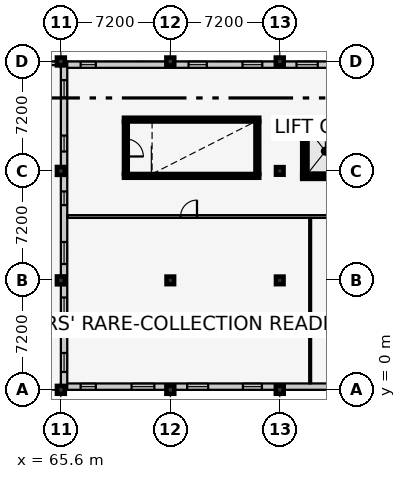
"""IFC4 building model, lengths in metres.
Left out: names, types, materials, properties, quantities, classifications, styles, units other than length and angle.
Written with IfcOpenShell. Run it as: python <this file> out.ifc"""

import sys

from ifc_helpers import new_model, si_unit, direction, frame, frame_2d, origin, origin_2d, place, context, subcontext, project, spatial, rectangle, extrude, element, fill, save


model = new_model("IFC4")
c1 = context("Model", 3, precision=1e-05, world=origin(), true_north=direction((0.0, 1.0)))
c2 = subcontext(c1, "Body", "Model", "MODEL_VIEW")
j1 = project(units=[si_unit("LENGTHUNIT", "METRE"), si_unit("PLANEANGLEUNIT", "RADIAN")], contexts=[c1])
p1 = place(None, origin())
s1 = spatial("IfcSite", under=j1, at=p1, CompositionType="ELEMENT")
p2 = place(p1, origin())
s2 = spatial("IfcBuilding", under=s1, at=p2, CompositionType="ELEMENT")
p3 = place(p2, frame((0.0, 0.0, 18.0)))
s3 = spatial("IfcBuildingStorey", under=s2, at=p3, CompositionType="ELEMENT", Elevation=18.0)
for number, where, z_axis, x_axis in (
    (1, (65.6, 0.0, 0.0), (0.0, 0.0, 1.0), (1.0, 0.0, 0.0)),
    (2, (65.6, 7.2, 0.0), (0.0, 0.0, 1.0), (1.0, 0.0, 0.0)),
    (3, (65.6, 14.4, 0.0), (0.0, 0.0, 1.0), (1.0, 0.0, 0.0)),
    (4, (65.6, 21.6, 0.0), (0.0, 0.0, 1.0), (1.0, 0.0, 0.0)),
    (5, (72.8, 0.0, 0.0), (0.0, 0.0, 1.0), (1.0, 0.0, 0.0)),
):
    element("IfcColumn", number, at=place(p3, frame(where, z_axis=z_axis, x_axis=x_axis)), inside=s3, PredefinedType="COLUMN", context=c2, shape_type="SweptSolid", body=[
        extrude(rectangle(XDim=0.52, YDim=0.52, at=origin_2d()), origin(), (0.0, 0.0, 1.0), 3.9),
    ])
p4 = place(p3, frame((72.8, 7.2, 0.0), z_axis=(0.0, 0.0, 1.0), x_axis=(1.0, 0.0, 0.0)))
e6 = element("IfcColumn", 6, at=p4, inside=s3, PredefinedType="COLUMN", context=c2, shape_type="SweptSolid", body=[
    extrude(rectangle(XDim=0.5, YDim=0.5, at=origin_2d()), origin(), (0.0, 0.0, 1.0), 3.9),
])
for number, where, z_axis, x_axis in (
    (7, (72.8, 21.6, 0.0), (0.0, 0.0, 1.0), (1.0, 0.0, 0.0)),
    (8, (80.0, 0.0, 0.0), (0.0, 0.0, 1.0), (1.0, 0.0, 0.0)),
):
    element("IfcColumn", number, at=place(p3, frame(where, z_axis=z_axis, x_axis=x_axis)), inside=s3, PredefinedType="COLUMN", context=c2, shape_type="SweptSolid", body=[
        extrude(rectangle(XDim=0.52, YDim=0.52, at=origin_2d()), origin(), (0.0, 0.0, 1.0), 3.9),
    ])
for number, where, z_axis, x_axis in (
    (9, (80.0, 7.2, 0.0), (0.0, 0.0, 1.0), (1.0, 0.0, 0.0)),
    (10, (80.0, 14.4, 0.0), (0.0, 0.0, 1.0), (1.0, 0.0, 0.0)),
):
    element("IfcColumn", number, at=place(p3, frame(where, z_axis=z_axis, x_axis=x_axis)), inside=s3, PredefinedType="COLUMN", context=c2, shape_type="SweptSolid", body=[
        extrude(rectangle(XDim=0.5, YDim=0.5, at=origin_2d()), origin(), (0.0, 0.0, 1.0), 3.9),
    ])
p5 = place(p3, frame((80.0, 21.6, 0.0), z_axis=(0.0, 0.0, 1.0), x_axis=(1.0, 0.0, 0.0)))
e11 = element("IfcColumn", 11, at=p5, inside=s3, PredefinedType="COLUMN", context=c2, shape_type="SweptSolid", body=[
    extrude(rectangle(XDim=0.52, YDim=0.52, at=origin_2d()), origin(), (0.0, 0.0, 1.0), 3.9),
])
p6 = place(p3, frame((94.4, 0.21, 0.0), z_axis=(0.0, 0.0, 1.0), x_axis=(-1.0, 0.0, 0.0)))
e12 = element("IfcWall", 12, at=p6, inside=s3, PredefinedType="SOLIDWALL", context=c2, shape_type="SweptSolid", body=[
    extrude(rectangle(XDim=28.8, YDim=0.42, at=frame_2d((14.4, 0.0))), origin(), (0.0, 0.0, 1.0), 2.955),
])
p7 = place(p6, frame((1.075, 0.0, 0.9)))
e13 = element("IfcOpeningElement", 13, at=p7, cuts=e12, PredefinedType="OPENING", context=c2, shape_type="SweptSolid", body=[
    extrude(rectangle(XDim=1.45, YDim=1.45, at=frame_2d((0.725, 0.725))), frame((0.0, 0.222, 0.0), z_axis=(0.0, -1.0, 0.0), x_axis=(1.0, 0.0, 0.0)), (0.0, 0.0, 1.0), 0.444),
])
p8 = place(p6, frame((4.95, 0.0, 0.9)))
e14 = element("IfcOpeningElement", 14, at=p8, cuts=e12, PredefinedType="OPENING", context=c2, shape_type="SweptSolid", body=[
    extrude(rectangle(XDim=0.9, YDim=1.6, at=frame_2d((0.45, 0.8))), frame((0.0, 0.222, 0.0), z_axis=(0.0, -1.0, 0.0), x_axis=(1.0, 0.0, 0.0)), (0.0, 0.0, 1.0), 0.444),
])
p9 = place(p6, frame((8.475, 0.0, 0.9)))
e15 = element("IfcOpeningElement", 15, at=p9, cuts=e12, PredefinedType="OPENING", context=c2, shape_type="SweptSolid", body=[
    extrude(rectangle(XDim=1.05, YDim=1.6, at=frame_2d((0.525, 0.8))), frame((0.0, 0.222, 0.0), z_axis=(0.0, -1.0, 0.0), x_axis=(1.0, 0.0, 0.0)), (0.0, 0.0, 1.0), 0.444),
])
p10 = place(p6, frame((15.575, 0.0, 0.9)))
e16 = element("IfcOpeningElement", 16, at=p10, cuts=e12, PredefinedType="OPENING", context=c2, shape_type="SweptSolid", body=[
    extrude(rectangle(XDim=1.25, YDim=1.6, at=frame_2d((0.625, 0.8))), frame((0.0, 0.222, 0.0), z_axis=(0.0, -1.0, 0.0), x_axis=(1.0, 0.0, 0.0)), (0.0, 0.0, 1.0), 0.444),
])
p11 = place(p6, frame((19.11, 0.0, 0.9)))
e17 = element("IfcOpeningElement", 17, at=p11, cuts=e12, PredefinedType="OPENING", context=c2, shape_type="SweptSolid", body=[
    extrude(rectangle(XDim=1.38, YDim=1.6, at=frame_2d((0.69, 0.8))), frame((0.0, 0.222, 0.0), z_axis=(0.0, -1.0, 0.0), x_axis=(1.0, 0.0, 0.0)), (0.0, 0.0, 1.0), 0.444),
])
p12 = place(p6, frame((22.65, 0.0, 0.9)))
e18 = element("IfcOpeningElement", 18, at=p12, cuts=e12, PredefinedType="OPENING", context=c2, shape_type="SweptSolid", body=[
    extrude(rectangle(XDim=1.5, YDim=1.6, at=frame_2d((0.75, 0.8))), frame((0.0, 0.222, 0.0), z_axis=(0.0, -1.0, 0.0), x_axis=(1.0, 0.0, 0.0)), (0.0, 0.0, 1.0), 0.444),
])
p13 = place(p6, frame((26.5, 0.0, 0.9)))
e19 = element("IfcOpeningElement", 19, at=p13, cuts=e12, PredefinedType="OPENING", context=c2, shape_type="SweptSolid", body=[
    extrude(rectangle(XDim=1.0, YDim=1.75, at=frame_2d((0.5, 0.875))), frame((0.0, 0.222, 0.0), z_axis=(0.0, -1.0, 0.0), x_axis=(1.0, 0.0, 0.0)), (0.0, 0.0, 1.0), 0.444),
])
p14 = place(p3, frame((65.6, 21.39, 0.0), z_axis=(0.0, 0.0, 1.0), x_axis=(1.0, 0.0, 0.0)))
e20 = element("IfcWall", 20, at=p14, inside=s3, PredefinedType="SOLIDWALL", context=c2, shape_type="SweptSolid", body=[
    extrude(rectangle(XDim=28.8, YDim=0.42, at=frame_2d((14.4, 0.0))), origin(), (0.0, 0.0, 1.0), 2.955),
])
p15 = place(p14, frame((1.3, 0.0, 0.9)))
e21 = element("IfcOpeningElement", 21, at=p15, cuts=e20, PredefinedType="OPENING", context=c2, shape_type="SweptSolid", body=[
    extrude(rectangle(XDim=1.0, YDim=1.35, at=frame_2d((0.5, 0.675))), frame((0.0, 0.222, 0.0), z_axis=(0.0, -1.0, 0.0), x_axis=(1.0, 0.0, 0.0)), (0.0, 0.0, 1.0), 0.444),
])
p16 = place(p14, frame((8.4, 0.0, 0.9)))
e22 = element("IfcOpeningElement", 22, at=p16, cuts=e20, PredefinedType="OPENING", context=c2, shape_type="SweptSolid", body=[
    extrude(rectangle(XDim=1.2, YDim=1.35, at=frame_2d((0.6, 0.675))), frame((0.0, 0.222, 0.0), z_axis=(0.0, -1.0, 0.0), x_axis=(1.0, 0.0, 0.0)), (0.0, 0.0, 1.0), 0.444),
])
p17 = place(p14, frame((11.95, 0.0, 0.9)))
e23 = element("IfcOpeningElement", 23, at=p17, cuts=e20, PredefinedType="OPENING", context=c2, shape_type="SweptSolid", body=[
    extrude(rectangle(XDim=1.3, YDim=1.35, at=frame_2d((0.65, 0.675))), frame((0.0, 0.222, 0.0), z_axis=(0.0, -1.0, 0.0), x_axis=(1.0, 0.0, 0.0)), (0.0, 0.0, 1.0), 0.444),
])
p18 = place(p14, frame((15.5, 0.0, 0.9)))
e24 = element("IfcOpeningElement", 24, at=p18, cuts=e20, PredefinedType="OPENING", context=c2, shape_type="SweptSolid", body=[
    extrude(rectangle(XDim=1.4, YDim=1.35, at=frame_2d((0.7, 0.675))), frame((0.0, 0.222, 0.0), z_axis=(0.0, -1.0, 0.0), x_axis=(1.0, 0.0, 0.0)), (0.0, 0.0, 1.0), 0.444),
])
p19 = place(p14, frame((22.875, 0.0, 0.9)))
e25 = element("IfcOpeningElement", 25, at=p19, cuts=e20, PredefinedType="OPENING", context=c2, shape_type="SweptSolid", body=[
    extrude(rectangle(XDim=1.05, YDim=1.45, at=frame_2d((0.525, 0.725))), frame((0.0, 0.222, 0.0), z_axis=(0.0, -1.0, 0.0), x_axis=(1.0, 0.0, 0.0)), (0.0, 0.0, 1.0), 0.444),
])
p20 = place(p14, frame((26.425, 0.0, 0.9)))
e26 = element("IfcOpeningElement", 26, at=p20, cuts=e20, PredefinedType="OPENING", context=c2, shape_type="SweptSolid", body=[
    extrude(rectangle(XDim=1.15, YDim=1.45, at=frame_2d((0.575, 0.725))), frame((0.0, 0.222, 0.0), z_axis=(0.0, -1.0, 0.0), x_axis=(1.0, 0.0, 0.0)), (0.0, 0.0, 1.0), 0.444),
])
p21 = place(p3, frame((65.81, 0.0, 0.0), z_axis=(0.0, 0.0, 1.0), x_axis=(0.0, 1.0, 0.0)))
e27 = element("IfcWall", 27, at=p21, inside=s3, PredefinedType="SOLIDWALL", context=c2, shape_type="SweptSolid", body=[
    extrude(rectangle(XDim=21.6, YDim=0.42, at=frame_2d((10.8, 0.0))), origin(), (0.0, 0.0, 1.0), 3.055),
])
p22 = place(p21, frame((1.175, 0.0, 0.9)))
e28 = element("IfcOpeningElement", 28, at=p22, cuts=e27, PredefinedType="OPENING", context=c2, shape_type="SweptSolid", body=[
    extrude(rectangle(XDim=1.25, YDim=1.45, at=frame_2d((0.625, 0.725))), frame((0.0, 0.222, 0.0), z_axis=(0.0, -1.0, 0.0), x_axis=(1.0, 0.0, 0.0)), (0.0, 0.0, 1.0), 0.444),
])
p23 = place(p21, frame((4.725, 0.0, 0.9)))
e29 = element("IfcOpeningElement", 29, at=p23, cuts=e27, PredefinedType="OPENING", context=c2, shape_type="SweptSolid", body=[
    extrude(rectangle(XDim=1.35, YDim=1.45, at=frame_2d((0.675, 0.725))), frame((0.0, 0.222, 0.0), z_axis=(0.0, -1.0, 0.0), x_axis=(1.0, 0.0, 0.0)), (0.0, 0.0, 1.0), 0.444),
])
p24 = place(p21, frame((8.275, 0.0, 0.9)))
e30 = element("IfcOpeningElement", 30, at=p24, cuts=e27, PredefinedType="OPENING", context=c2, shape_type="SweptSolid", body=[
    extrude(rectangle(XDim=1.45, YDim=1.45, at=frame_2d((0.725, 0.725))), frame((0.0, 0.222, 0.0), z_axis=(0.0, -1.0, 0.0), x_axis=(1.0, 0.0, 0.0)), (0.0, 0.0, 1.0), 0.444),
])
p25 = place(p21, frame((12.15, 0.0, 0.9)))
e31 = element("IfcOpeningElement", 31, at=p25, cuts=e27, PredefinedType="OPENING", context=c2, shape_type="SweptSolid", body=[
    extrude(rectangle(XDim=0.9, YDim=1.6, at=frame_2d((0.45, 0.8))), frame((0.0, 0.222, 0.0), z_axis=(0.0, -1.0, 0.0), x_axis=(1.0, 0.0, 0.0)), (0.0, 0.0, 1.0), 0.444),
])
p26 = place(p21, frame((15.675, 0.0, 0.9)))
e32 = element("IfcOpeningElement", 32, at=p26, cuts=e27, PredefinedType="OPENING", context=c2, shape_type="SweptSolid", body=[
    extrude(rectangle(XDim=1.05, YDim=1.6, at=frame_2d((0.525, 0.8))), frame((0.0, 0.222, 0.0), z_axis=(0.0, -1.0, 0.0), x_axis=(1.0, 0.0, 0.0)), (0.0, 0.0, 1.0), 0.444),
])
p27 = place(p21, frame((19.225, 0.0, 0.9)))
e33 = element("IfcOpeningElement", 33, at=p27, cuts=e27, PredefinedType="OPENING", context=c2, shape_type="SweptSolid", body=[
    extrude(rectangle(XDim=1.15, YDim=1.6, at=frame_2d((0.575, 0.8))), frame((0.0, 0.222, 0.0), z_axis=(0.0, -1.0, 0.0), x_axis=(1.0, 0.0, 0.0)), (0.0, 0.0, 1.0), 0.444),
])
p28 = place(p3, frame((58.55, 21.48, 0.0), z_axis=(0.0, 0.0, 1.0), x_axis=(1.0, 0.0, 0.0)))
e34 = element("IfcWall", 34, at=p28, inside=s3, PredefinedType="PARAPET", context=c2, shape_type="SweptSolid", body=[
    extrude(rectangle(XDim=6.9, YDim=0.24, at=frame_2d((3.45, 0.0))), origin(), (0.0, 0.0, 1.0), 0.65),
])
for number, where, z_axis, x_axis in (
    (35, (69.75, 14.075, 0.0), (0.0, 0.0, 1.0), (1.0, 0.0, 0.0)),
    (36, (78.65, 17.775, 0.0), (0.0, 0.0, 1.0), (-1.0, 0.0, 0.0)),
):
    element("IfcWall", number, at=place(p3, frame(where, z_axis=z_axis, x_axis=x_axis)), inside=s3, PredefinedType="SHEAR", context=c2, shape_type="SweptSolid", body=[
        extrude(rectangle(XDim=8.9, YDim=0.25, at=frame_2d((4.45, 0.0))), origin(), (0.0, 0.0, 1.0), 3.66),
    ])
p29 = place(p3, frame((69.875, 17.65, 0.0), z_axis=(0.0, 0.0, 1.0), x_axis=(0.0, -1.0, 0.0)))
e37 = element("IfcWall", 37, at=p29, inside=s3, PredefinedType="SHEAR", context=c2, shape_type="SweptSolid", body=[
    extrude(rectangle(XDim=3.45, YDim=0.25, at=frame_2d((1.725, 0.0))), origin(), (0.0, 0.0, 1.0), 3.66),
])
p30 = place(p29, frame((1.15, 0.0, 0.0)))
e38 = element("IfcOpeningElement", 38, at=p30, cuts=e37, PredefinedType="OPENING", context=c2, shape_type="SweptSolid", body=[
    extrude(rectangle(XDim=1.15, YDim=2.15, at=frame_2d((0.575, 1.075))), frame((0.0, 0.137, 0.0), z_axis=(0.0, -1.0, 0.0), x_axis=(1.0, 0.0, 0.0)), (0.0, 0.0, 1.0), 0.274),
])
p31 = place(p3, frame((78.525, 14.2, 0.0), z_axis=(0.0, 0.0, 1.0), x_axis=(0.0, 1.0, 0.0)))
e39 = element("IfcWall", 39, at=p31, inside=s3, PredefinedType="SHEAR", context=c2, shape_type="SweptSolid", body=[
    extrude(rectangle(XDim=3.45, YDim=0.25, at=frame_2d((1.725, 0.0))), origin(), (0.0, 0.0, 1.0), 3.66),
])
p32 = place(p3, frame((81.475, 14.0, 0.0), z_axis=(0.0, 0.0, 1.0), x_axis=(1.0, 0.0, 0.0)))
e40 = element("IfcWall", 40, at=p32, inside=s3, PredefinedType="SHEAR", context=c2, shape_type="SweptSolid", body=[
    extrude(rectangle(XDim=3.05, YDim=0.25, at=frame_2d((1.525, 0.0))), origin(), (0.0, 0.0, 1.0), 3.66),
])
p33 = place(p32, frame((0.725, 0.0, 0.0)))
e41 = element("IfcOpeningElement", 41, at=p33, cuts=e40, PredefinedType="OPENING", context=c2, shape_type="SweptSolid", body=[
    extrude(rectangle(XDim=1.6, YDim=2.3, at=frame_2d((0.8, 1.15))), frame((0.0, 0.137, 0.0), z_axis=(0.0, -1.0, 0.0), x_axis=(1.0, 0.0, 0.0)), (0.0, 0.0, 1.0), 0.274),
])
p34 = place(p3, frame((84.525, 17.4, 0.0), z_axis=(0.0, 0.0, 1.0), x_axis=(-1.0, 0.0, 0.0)))
e42 = element("IfcWall", 42, at=p34, inside=s3, PredefinedType="SHEAR", context=c2, shape_type="SweptSolid", body=[
    extrude(rectangle(XDim=3.05, YDim=0.25, at=frame_2d((1.525, 0.0))), origin(), (0.0, 0.0, 1.0), 3.66),
])
p35 = place(p3, frame((81.6, 17.4, 0.0), z_axis=(0.0, 0.0, 1.0), x_axis=(0.0, -1.0, 0.0)))
e43 = element("IfcWall", 43, at=p35, inside=s3, PredefinedType="SHEAR", context=c2, shape_type="SweptSolid", body=[
    extrude(rectangle(XDim=3.4, YDim=0.25, at=frame_2d((1.7, 0.0))), origin(), (0.0, 0.0, 1.0), 3.66),
])
p36 = place(p3, frame((66.03, 11.4, 0.0), z_axis=(0.0, 0.0, 1.0), x_axis=(1.0, 0.0, 0.0)))
e44 = element("IfcWall", 44, at=p36, inside=s3, PredefinedType="PARTITIONING", context=c2, shape_type="SweptSolid", body=[
    extrude(rectangle(XDim=27.94, YDim=0.18, at=frame_2d((13.97, 0.0))), origin(), (0.0, 0.0, 1.0), 3.66),
])
p37 = place(p36, frame((7.445, 0.0, 0.0)))
e45 = element("IfcOpeningElement", 45, at=p37, cuts=e44, PredefinedType="OPENING", context=c2, shape_type="SweptSolid", body=[
    extrude(rectangle(XDim=1.08, YDim=2.15, at=frame_2d((0.54, 1.075))), frame((0.0, 0.102, 0.0), z_axis=(0.0, -1.0, 0.0), x_axis=(1.0, 0.0, 0.0)), (0.0, 0.0, 1.0), 0.204),
])
p38 = place(p36, frame((21.435, 0.0, 0.0)))
e46 = element("IfcOpeningElement", 46, at=p38, cuts=e44, PredefinedType="OPENING", context=c2, shape_type="SweptSolid", body=[
    extrude(rectangle(XDim=1.04, YDim=2.15, at=frame_2d((0.52, 1.075))), frame((0.0, 0.102, 0.0), z_axis=(0.0, -1.0, 0.0), x_axis=(1.0, 0.0, 0.0)), (0.0, 0.0, 1.0), 0.204),
])
p39 = place(p3, frame((82.0, 0.43, 0.0), z_axis=(0.0, 0.0, 1.0), x_axis=(0.0, 1.0, 0.0)))
e47 = element("IfcWall", 47, at=p39, inside=s3, PredefinedType="PARTITIONING", context=c2, shape_type="SweptSolid", body=[
    extrude(rectangle(XDim=10.87, YDim=0.125, at=frame_2d((5.435, 0.0))), origin(), (0.0, 0.0, 1.0), 3.66),
])
p40 = place(p10, origin())
e48 = element("IfcWindow", 48, at=p40, inside=s3, PartitioningType="SINGLE_PANEL", PredefinedType="WINDOW", context=c2, shape_type="SweptSolid", body=[
    extrude(rectangle(XDim=1.25, YDim=1.6, at=frame_2d((0.625, 0.8))), frame((0.0, 0.03, 0.0), z_axis=(0.0, -1.0, 0.0), x_axis=(1.0, 0.0, 0.0)), (0.0, 0.0, 1.0), 0.06),
])
fill(e16, e48)
p41 = place(p11, origin())
e49 = element("IfcWindow", 49, at=p41, inside=s3, PartitioningType="SINGLE_PANEL", PredefinedType="WINDOW", context=c2, shape_type="SweptSolid", body=[
    extrude(rectangle(XDim=1.38, YDim=1.6, at=frame_2d((0.69, 0.8))), frame((0.0, 0.03, 0.0), z_axis=(0.0, -1.0, 0.0), x_axis=(1.0, 0.0, 0.0)), (0.0, 0.0, 1.0), 0.06),
])
fill(e17, e49)
p42 = place(p12, origin())
e50 = element("IfcWindow", 50, at=p42, inside=s3, PartitioningType="SINGLE_PANEL", PredefinedType="WINDOW", context=c2, shape_type="SweptSolid", body=[
    extrude(rectangle(XDim=1.5, YDim=1.6, at=frame_2d((0.75, 0.8))), frame((0.0, 0.03, 0.0), z_axis=(0.0, -1.0, 0.0), x_axis=(1.0, 0.0, 0.0)), (0.0, 0.0, 1.0), 0.06),
])
fill(e18, e50)
p43 = place(p13, origin())
e51 = element("IfcWindow", 51, at=p43, inside=s3, PartitioningType="SINGLE_PANEL", PredefinedType="WINDOW", context=c2, shape_type="SweptSolid", body=[
    extrude(rectangle(XDim=1.0, YDim=1.75, at=frame_2d((0.5, 0.875))), frame((0.0, 0.03, 0.0), z_axis=(0.0, -1.0, 0.0), x_axis=(1.0, 0.0, 0.0)), (0.0, 0.0, 1.0), 0.06),
])
fill(e19, e51)
p44 = place(p15, origin())
e52 = element("IfcWindow", 52, at=p44, inside=s3, PartitioningType="SINGLE_PANEL", PredefinedType="WINDOW", context=c2, shape_type="SweptSolid", body=[
    extrude(rectangle(XDim=1.0, YDim=1.35, at=frame_2d((0.5, 0.675))), frame((0.0, 0.03, 0.0), z_axis=(0.0, -1.0, 0.0), x_axis=(1.0, 0.0, 0.0)), (0.0, 0.0, 1.0), 0.06),
])
fill(e21, e52)
p45 = place(p16, origin())
e53 = element("IfcWindow", 53, at=p45, inside=s3, PartitioningType="SINGLE_PANEL", PredefinedType="WINDOW", context=c2, shape_type="SweptSolid", body=[
    extrude(rectangle(XDim=1.2, YDim=1.35, at=frame_2d((0.6, 0.675))), frame((0.0, 0.03, 0.0), z_axis=(0.0, -1.0, 0.0), x_axis=(1.0, 0.0, 0.0)), (0.0, 0.0, 1.0), 0.06),
])
fill(e22, e53)
p46 = place(p17, origin())
e54 = element("IfcWindow", 54, at=p46, inside=s3, PartitioningType="SINGLE_PANEL", PredefinedType="WINDOW", context=c2, shape_type="SweptSolid", body=[
    extrude(rectangle(XDim=1.3, YDim=1.35, at=frame_2d((0.65, 0.675))), frame((0.0, 0.03, 0.0), z_axis=(0.0, -1.0, 0.0), x_axis=(1.0, 0.0, 0.0)), (0.0, 0.0, 1.0), 0.06),
])
fill(e23, e54)
p47 = place(p18, origin())
e55 = element("IfcWindow", 55, at=p47, inside=s3, PartitioningType="SINGLE_PANEL", PredefinedType="WINDOW", context=c2, shape_type="SweptSolid", body=[
    extrude(rectangle(XDim=1.4, YDim=1.35, at=frame_2d((0.7, 0.675))), frame((0.0, 0.03, 0.0), z_axis=(0.0, -1.0, 0.0), x_axis=(1.0, 0.0, 0.0)), (0.0, 0.0, 1.0), 0.06),
])
fill(e24, e55)
p48 = place(p22, origin())
e56 = element("IfcWindow", 56, at=p48, inside=s3, PartitioningType="SINGLE_PANEL", PredefinedType="WINDOW", context=c2, shape_type="SweptSolid", body=[
    extrude(rectangle(XDim=1.25, YDim=1.45, at=frame_2d((0.625, 0.725))), frame((0.0, 0.03, 0.0), z_axis=(0.0, -1.0, 0.0), x_axis=(1.0, 0.0, 0.0)), (0.0, 0.0, 1.0), 0.06),
])
fill(e28, e56)
p49 = place(p23, origin())
e57 = element("IfcWindow", 57, at=p49, inside=s3, PartitioningType="SINGLE_PANEL", PredefinedType="WINDOW", context=c2, shape_type="SweptSolid", body=[
    extrude(rectangle(XDim=1.35, YDim=1.45, at=frame_2d((0.675, 0.725))), frame((0.0, 0.03, 0.0), z_axis=(0.0, -1.0, 0.0), x_axis=(1.0, 0.0, 0.0)), (0.0, 0.0, 1.0), 0.06),
])
fill(e29, e57)
p50 = place(p24, origin())
e58 = element("IfcWindow", 58, at=p50, inside=s3, PartitioningType="SINGLE_PANEL", PredefinedType="WINDOW", context=c2, shape_type="SweptSolid", body=[
    extrude(rectangle(XDim=1.45, YDim=1.45, at=frame_2d((0.725, 0.725))), frame((0.0, 0.03, 0.0), z_axis=(0.0, -1.0, 0.0), x_axis=(1.0, 0.0, 0.0)), (0.0, 0.0, 1.0), 0.06),
])
fill(e30, e58)
p51 = place(p25, origin())
e59 = element("IfcWindow", 59, at=p51, inside=s3, PartitioningType="SINGLE_PANEL", PredefinedType="WINDOW", context=c2, shape_type="SweptSolid", body=[
    extrude(rectangle(XDim=0.9, YDim=1.6, at=frame_2d((0.45, 0.8))), frame((0.0, 0.03, 0.0), z_axis=(0.0, -1.0, 0.0), x_axis=(1.0, 0.0, 0.0)), (0.0, 0.0, 1.0), 0.06),
])
fill(e31, e59)
p52 = place(p26, origin())
e60 = element("IfcWindow", 60, at=p52, inside=s3, PartitioningType="SINGLE_PANEL", PredefinedType="WINDOW", context=c2, shape_type="SweptSolid", body=[
    extrude(rectangle(XDim=1.05, YDim=1.6, at=frame_2d((0.525, 0.8))), frame((0.0, 0.03, 0.0), z_axis=(0.0, -1.0, 0.0), x_axis=(1.0, 0.0, 0.0)), (0.0, 0.0, 1.0), 0.06),
])
fill(e32, e60)
p53 = place(p27, origin())
e61 = element("IfcWindow", 61, at=p53, inside=s3, PartitioningType="SINGLE_PANEL", PredefinedType="WINDOW", context=c2, shape_type="SweptSolid", body=[
    extrude(rectangle(XDim=1.15, YDim=1.6, at=frame_2d((0.575, 0.8))), frame((0.0, 0.03, 0.0), z_axis=(0.0, -1.0, 0.0), x_axis=(1.0, 0.0, 0.0)), (0.0, 0.0, 1.0), 0.06),
])
fill(e33, e61)
p54 = place(p30, origin())
e62 = element("IfcDoor", 62, at=p54, inside=s3, OperationType="SINGLE_SWING_RIGHT", PredefinedType="DOOR", context=c2, shape_type="SweptSolid", body=[
    extrude(rectangle(XDim=1.15, YDim=2.15, at=frame_2d((0.575, 1.075))), frame((0.0, 0.025, 0.0), z_axis=(0.0, -1.0, 0.0), x_axis=(1.0, 0.0, 0.0)), (0.0, 0.0, 1.0), 0.05),
])
fill(e38, e62)
p55 = place(p33, origin())
e63 = element("IfcDoor", 63, at=p55, inside=s3, OperationType="DOUBLE_DOOR_SLIDING", PredefinedType="DOOR", context=c2, shape_type="SweptSolid", body=[
    extrude(rectangle(XDim=1.6, YDim=2.3, at=frame_2d((0.8, 1.15))), frame((0.0, 0.025, 0.0), z_axis=(0.0, -1.0, 0.0), x_axis=(1.0, 0.0, 0.0)), (0.0, 0.0, 1.0), 0.05),
])
fill(e41, e63)
p56 = place(p37, origin())
e64 = element("IfcDoor", 64, at=p56, inside=s3, OperationType="SINGLE_SWING_RIGHT", PredefinedType="DOOR", context=c2, shape_type="SweptSolid", body=[
    extrude(rectangle(XDim=1.08, YDim=2.15, at=frame_2d((0.54, 1.075))), frame((0.0, 0.025, 0.0), z_axis=(0.0, -1.0, 0.0), x_axis=(1.0, 0.0, 0.0)), (0.0, 0.0, 1.0), 0.05),
])
fill(e45, e64)
save(model, sys.argv[1])
